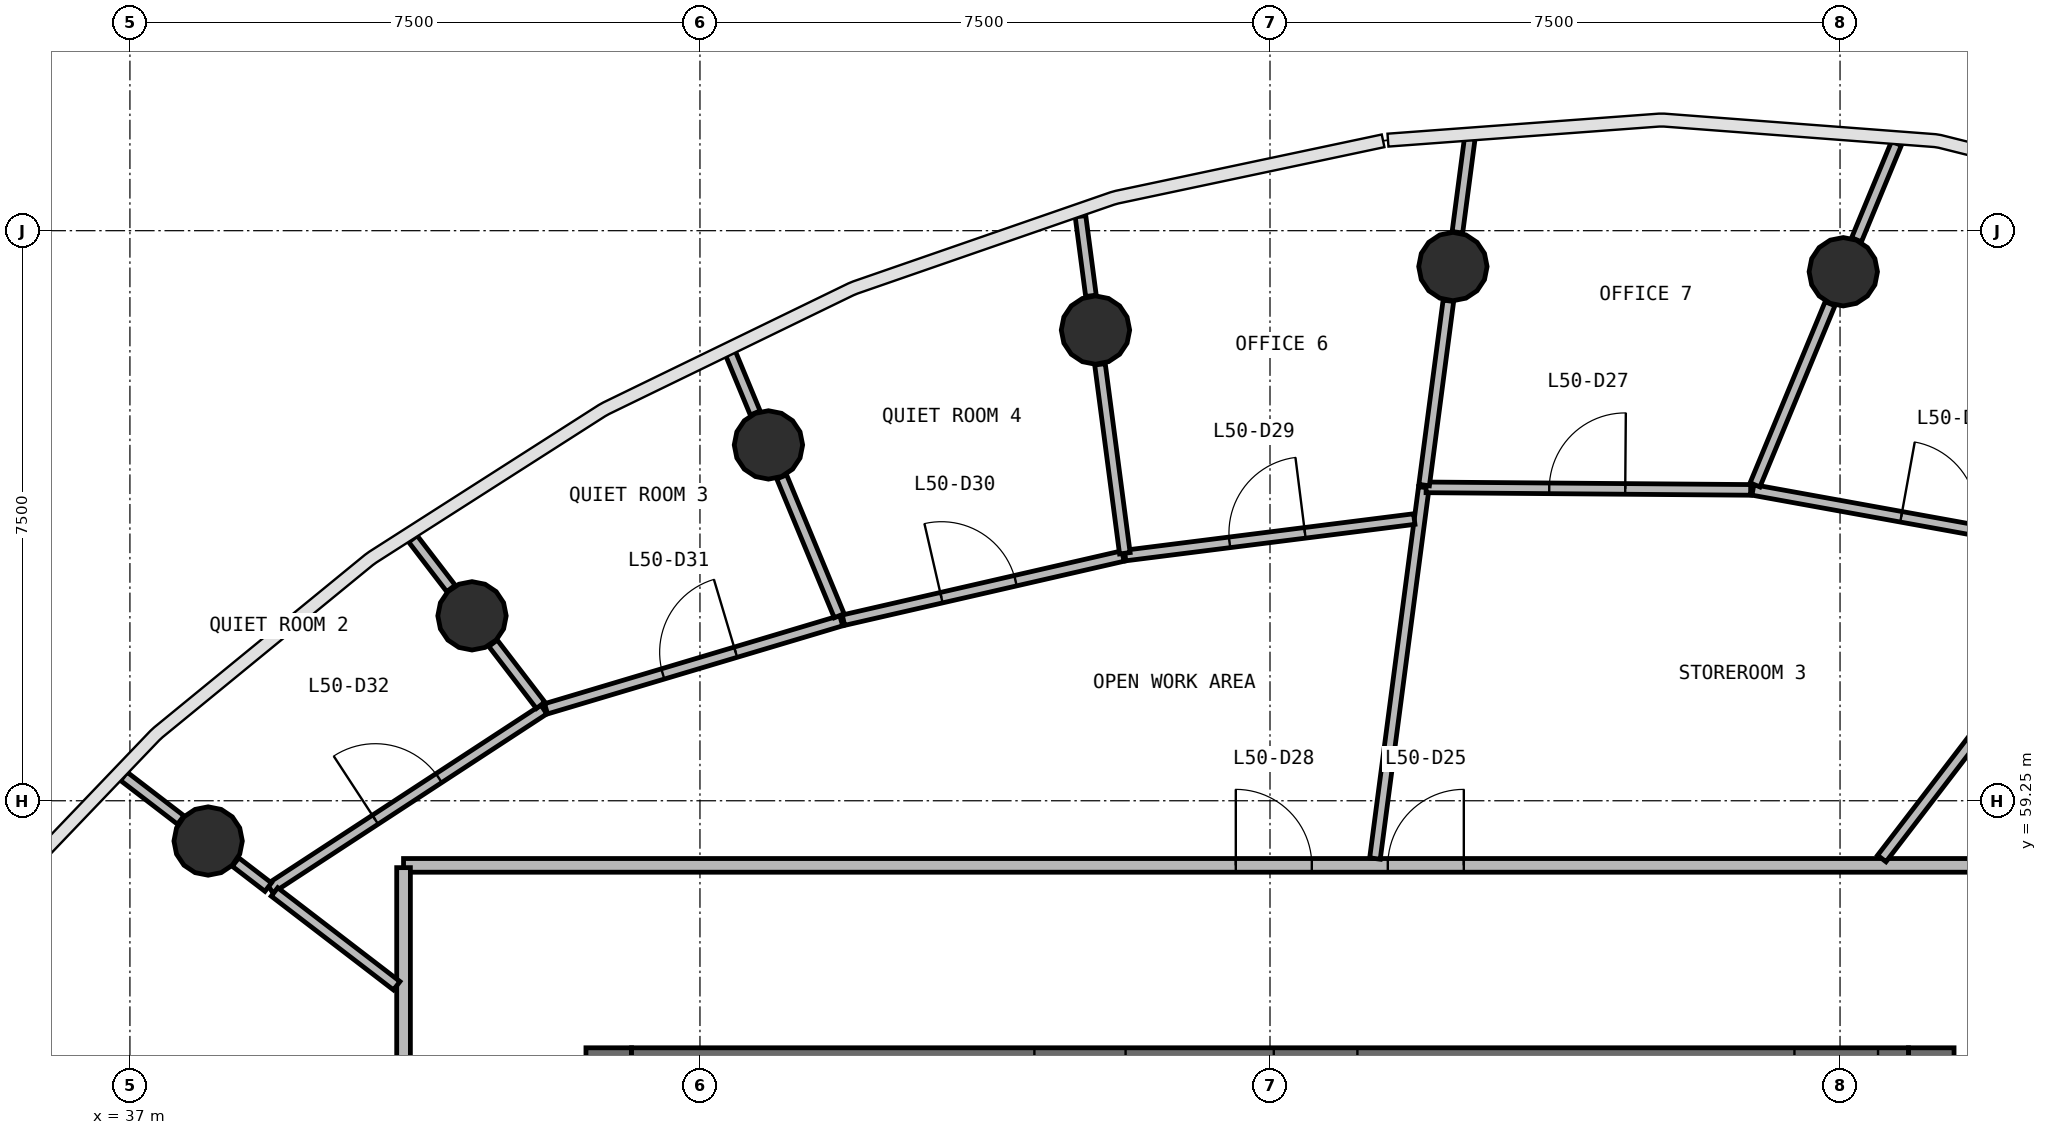
"""IFC4 building model, lengths in metres.
Left out: names, types, materials, properties, quantities, classifications, styles, units other than length and angle.
Written with IfcOpenShell. Run it as: python <this file> out.ifc"""

import sys

from ifc_helpers import new_model, si_unit, direction, frame, frame_2d, origin, origin_2d, place, context, subcontext, project, spatial, rectangle, circle, extrude, source, transform, mapped, element, fill, save


model = new_model("IFC4")
c1 = context("Model", 3, precision=1e-05, world=origin(), true_north=direction((0.0, 1.0)))
c2 = subcontext(c1, "Body", "Model", "MODEL_VIEW")
j1 = project(units=[si_unit("LENGTHUNIT", "METRE"), si_unit("PLANEANGLEUNIT", "RADIAN")], contexts=[c1])
p1 = place(None, origin())
s1 = spatial("IfcSite", under=j1, at=p1, CompositionType="ELEMENT")
p2 = place(p1, origin())
s2 = spatial("IfcBuilding", under=s1, at=p2, CompositionType="ELEMENT")
p3 = place(p2, frame((0.0, 0.0, 207.2)))
s3 = spatial("IfcBuildingStorey", under=s2, at=p3, CompositionType="ELEMENT", Elevation=207.2)
p4 = place(p3, frame((60.7, 40.0, 0.0), z_axis=(0.0, 0.0, 1.0), x_axis=(0.0, 1.0, 0.0)))
e1 = element("IfcWall", 1, at=p4, inside=s3, PredefinedType="SHEAR", context=c2, shape_type="SweptSolid", body=[
    extrude(rectangle(XDim=16.0, YDim=0.6, at=frame_2d((8.0, 0.0))), origin(), (0.0, 0.0, 1.0), 3.9),
])
p5 = place(p4, frame((7.1, 0.0, 0.0)))
e2 = element("IfcOpeningElement", 2, at=p5, cuts=e1, PredefinedType="OPENING", context=c2, shape_type="SweptSolid", body=[
    extrude(rectangle(XDim=1.8, YDim=2.1, at=frame_2d((0.9, 1.05))), frame((0.0, 0.31, 0.0), z_axis=(0.0, -1.0, 0.0), x_axis=(1.0, 0.0, 0.0)), (0.0, 0.0, 1.0), 0.62),
])
p6 = place(p3, frame((43.3, 56.0, 0.0), z_axis=(0.0, 0.0, 1.0), x_axis=(0.0, -1.0, 0.0)))
e3 = element("IfcWall", 3, at=p6, inside=s3, PredefinedType="SHEAR", context=c2, shape_type="SweptSolid", body=[
    extrude(rectangle(XDim=16.0, YDim=0.6, at=frame_2d((8.0, 0.0))), origin(), (0.0, 0.0, 1.0), 3.9),
])
p7 = place(p6, frame((7.1, 0.0, 0.0)))
e4 = element("IfcOpeningElement", 4, at=p7, cuts=e3, PredefinedType="OPENING", context=c2, shape_type="SweptSolid", body=[
    extrude(rectangle(XDim=1.8, YDim=2.1, at=frame_2d((0.9, 1.05))), frame((0.0, 0.31, 0.0), z_axis=(0.0, -1.0, 0.0), x_axis=(1.0, 0.0, 0.0)), (0.0, 0.0, 1.0), 0.62),
])
p8 = place(p3, frame((60.4, 55.7, 0.0), z_axis=(0.0, 0.0, 1.0), x_axis=(-1.0, 0.0, 0.0)))
e5 = element("IfcWall", 5, at=p8, inside=s3, PredefinedType="SHEAR", context=c2, shape_type="SweptSolid", body=[
    extrude(rectangle(XDim=16.8, YDim=0.6, at=frame_2d((8.4, 0.0))), origin(), (0.0, 0.0, 1.0), 3.9),
])
p9 = place(p8, frame((0.4, 0.0, 0.0)))
e6 = element("IfcOpeningElement", 6, at=p9, cuts=e5, PredefinedType="OPENING", context=c2, shape_type="SweptSolid", body=[
    extrude(rectangle(XDim=1.1, YDim=2.1, at=frame_2d((0.55, 1.05))), frame((0.0, 0.31, 0.0), z_axis=(0.0, -1.0, 0.0), x_axis=(1.0, 0.0, 0.0)), (0.0, 0.0, 1.0), 0.62),
])
p10 = place(p8, frame((10.3, 0.0, 0.0)))
e7 = element("IfcOpeningElement", 7, at=p10, cuts=e5, PredefinedType="OPENING", context=c2, shape_type="SweptSolid", body=[
    extrude(rectangle(XDim=1.2, YDim=2.1, at=frame_2d((0.6, 1.05))), frame((0.0, 0.31, 0.0), z_axis=(0.0, -1.0, 0.0), x_axis=(1.0, 0.0, 0.0)), (0.0, 0.0, 1.0), 0.62),
])
p11 = place(p8, frame((7.25, 0.0, 0.0)))
e8 = element("IfcOpeningElement", 8, at=p11, cuts=e5, PredefinedType="OPENING", context=c2, shape_type="SweptSolid", body=[
    extrude(rectangle(XDim=1.1, YDim=2.1, at=frame_2d((0.55, 1.05))), frame((0.0, 0.31, 0.0), z_axis=(0.0, -1.0, 0.0), x_axis=(1.0, 0.0, 0.0)), (0.0, 0.0, 1.0), 0.62),
])
m1 = source(origin(), c2, "Body", "SweptSolid", [
    extrude(circle(Radius=0.45, at=origin_2d()), origin(), (0.0, 0.0, 1.0), 3.9),
])
for number, where, z_axis, x_axis in (
    (9, (59.543, 66.21, 0.0), (0.0, 0.0, 1.0), (1.0, 0.0, 0.0)),
    (10, (54.406, 66.278, 0.0), (0.0, 0.0, 1.0), (1.0, 0.0, 0.0)),
    (11, (49.704, 65.442, 0.0), (0.0, 0.0, 1.0), (1.0, 0.0, 0.0)),
    (12, (45.401, 63.931, 0.0), (0.0, 0.0, 1.0), (1.0, 0.0, 0.0)),
    (13, (41.501, 61.683, 0.0), (0.0, 0.0, 1.0), (1.0, 0.0, 0.0)),
    (14, (38.029, 58.72, 0.0), (0.0, 0.0, 1.0), (1.0, 0.0, 0.0)),
):
    element("IfcColumn", number, at=place(p3, frame(where, z_axis=z_axis, x_axis=x_axis)), inside=s3, PredefinedType="COLUMN", context=c2, shape_type="MappedRepresentation", body=[
        mapped(m1, transform((0.0, 0.0, 0.0), scale=1.0)),
    ])
p12 = place(p3, frame((40.6, 58.4, 0.0), z_axis=(0.0, 0.0, 1.0), x_axis=(1.0, 0.0, 0.0)))
e15 = element("IfcWall", 15, at=p12, inside=s3, PredefinedType="PARTITIONING", context=c2, shape_type="SweptSolid", body=[
    extrude(rectangle(XDim=22.8, YDim=0.18, at=frame_2d((11.4, 0.0))), origin(), (0.0, 0.0, 1.0), 2.88),
])
p13 = place(p12, frame((12.95, 0.0, 0.0)))
e16 = element("IfcOpeningElement", 16, at=p13, cuts=e15, PredefinedType="OPENING", context=c2, shape_type="SweptSolid", body=[
    extrude(rectangle(XDim=1.0, YDim=2.1, at=frame_2d((0.5, 1.05))), frame((0.0, 0.1, 0.0), z_axis=(0.0, -1.0, 0.0), x_axis=(1.0, 0.0, 0.0)), (0.0, 0.0, 1.0), 0.2),
])
p14 = place(p12, frame((10.95, 0.0, 0.0)))
e17 = element("IfcOpeningElement", 17, at=p14, cuts=e15, PredefinedType="OPENING", context=c2, shape_type="SweptSolid", body=[
    extrude(rectangle(XDim=1.0, YDim=2.1, at=frame_2d((0.5, 1.05))), frame((0.0, 0.1, 0.0), z_axis=(0.0, -1.0, 0.0), x_axis=(1.0, 0.0, 0.0)), (0.0, 0.0, 1.0), 0.2),
])
p15 = place(p3, frame((40.6, 37.63, 0.0), z_axis=(0.0, 0.0, 1.0), x_axis=(0.0, 1.0, 0.0)))
e18 = element("IfcWall", 18, at=p15, inside=s3, PredefinedType="PARTITIONING", context=c2, shape_type="SweptSolid", body=[
    extrude(rectangle(XDim=20.74, YDim=0.18, at=frame_2d((10.37, 0.0))), origin(), (0.0, 0.0, 1.0), 2.88),
])
p16 = place(p15, frame((9.89, 0.0, 0.0)))
e19 = element("IfcOpeningElement", 19, at=p16, cuts=e18, PredefinedType="OPENING", context=c2, shape_type="SweptSolid", body=[
    extrude(rectangle(XDim=1.0, YDim=2.1, at=frame_2d((0.5, 1.05))), frame((0.0, 0.1, 0.0), z_axis=(0.0, -1.0, 0.0), x_axis=(1.0, 0.0, 0.0)), (0.0, 0.0, 1.0), 0.2),
])
p17 = place(p15, frame((4.29, 0.0, 0.0)))
e20 = element("IfcOpeningElement", 20, at=p17, cuts=e18, PredefinedType="OPENING", context=c2, shape_type="SweptSolid", body=[
    extrude(rectangle(XDim=1.0, YDim=2.1, at=frame_2d((0.5, 1.05))), frame((0.0, 0.1, 0.0), z_axis=(0.0, -1.0, 0.0), x_axis=(1.0, 0.0, 0.0)), (0.0, 0.0, 1.0), 0.2),
])
p18 = place(p3, frame((53.381, 58.49, 0.0), z_axis=(0.0, 0.0, 1.0), x_axis=(0.130510929427, 0.991446870639, 0.0)))
e21 = element("IfcWall", 21, at=p18, inside=s3, PredefinedType="PARTITIONING", context=c2, shape_type="SweptSolid", body=[
    extrude(rectangle(XDim=4.926, YDim=0.14, at=frame_2d((2.463, 0.0))), origin(), (0.0, 0.0, 1.0), 2.88),
])
p19 = place(p3, frame((58.354, 63.339, 0.0), z_axis=(0.0, 0.0, 1.0), x_axis=(0.983980456021, -0.178276364581, 0.0)))
e22 = element("IfcWall", 22, at=p19, inside=s3, PredefinedType="PARTITIONING", context=c2, shape_type="SweptSolid", body=[
    extrude(rectangle(XDim=4.833, YDim=0.14, at=frame_2d((2.417, 0.0))), origin(), (0.0, 0.0, 1.0), 2.88),
])
p20 = place(p19, frame((1.983, 0.0, 0.0)))
e23 = element("IfcOpeningElement", 23, at=p20, cuts=e22, PredefinedType="OPENING", context=c2, shape_type="SweptSolid", body=[
    extrude(rectangle(XDim=1.0, YDim=2.1, at=frame_2d((0.5, 1.05))), frame((0.0, 0.08, 0.0), z_axis=(0.0, -1.0, 0.0), x_axis=(1.0, 0.0, 0.0)), (0.0, 0.0, 1.0), 0.16),
])
p21 = place(p3, frame((54.054, 63.373, 0.0), z_axis=(0.0, 0.0, 1.0), x_axis=(0.999969319587, -0.007833255005, 0.0)))
e24 = element("IfcWall", 24, at=p21, inside=s3, PredefinedType="PARTITIONING", context=c2, shape_type="SweptSolid", body=[
    extrude(rectangle(XDim=4.27, YDim=0.14, at=frame_2d((2.135, 0.0))), origin(), (0.0, 0.0, 1.0), 2.88),
])
p22 = place(p21, frame((1.62, 0.0, 0.0)))
e25 = element("IfcOpeningElement", 25, at=p22, cuts=e24, PredefinedType="OPENING", context=c2, shape_type="SweptSolid", body=[
    extrude(rectangle(XDim=1.0, YDim=2.1, at=frame_2d((0.5, 1.05))), frame((0.0, 0.08, 0.0), z_axis=(0.0, -1.0, 0.0), x_axis=(1.0, 0.0, 0.0)), (0.0, 0.0, 1.0), 0.16),
])
p23 = place(p3, frame((38.843, 58.096, 0.0), z_axis=(0.0, 0.0, 1.0), x_axis=(0.83707650684, 0.547085844907, 0.0)))
e26 = element("IfcWall", 26, at=p23, inside=s3, PredefinedType="PARTITIONING", context=c2, shape_type="SweptSolid", body=[
    extrude(rectangle(XDim=4.305, YDim=0.14, at=frame_2d((2.152, 0.0))), origin(), (0.0, 0.0, 1.0), 2.88),
])
p24 = place(p23, frame((1.655, 0.0, 0.0)))
e27 = element("IfcOpeningElement", 27, at=p24, cuts=e26, PredefinedType="OPENING", context=c2, shape_type="SweptSolid", body=[
    extrude(rectangle(XDim=1.0, YDim=2.1, at=frame_2d((0.5, 1.05))), frame((0.0, 0.08, 0.0), z_axis=(0.0, -1.0, 0.0), x_axis=(1.0, 0.0, 0.0)), (0.0, 0.0, 1.0), 0.16),
])
p25 = place(p3, frame((42.475, 60.459, 0.0), z_axis=(0.0, 0.0, 1.0), x_axis=(0.958218274214, 0.286038002655, 0.0)))
e28 = element("IfcWall", 28, at=p25, inside=s3, PredefinedType="PARTITIONING", context=c2, shape_type="SweptSolid", body=[
    extrude(rectangle(XDim=4.053, YDim=0.14, at=frame_2d((2.027, 0.0))), origin(), (0.0, 0.0, 1.0), 2.88),
])
p26 = place(p25, frame((1.603, 0.0, 0.0)))
e29 = element("IfcOpeningElement", 29, at=p26, cuts=e28, PredefinedType="OPENING", context=c2, shape_type="SweptSolid", body=[
    extrude(rectangle(XDim=1.0, YDim=2.1, at=frame_2d((0.5, 1.05))), frame((0.0, 0.08, 0.0), z_axis=(0.0, -1.0, 0.0), x_axis=(1.0, 0.0, 0.0)), (0.0, 0.0, 1.0), 0.16),
])
p27 = place(p3, frame((50.094, 62.476, 0.0), z_axis=(0.0, 0.0, 1.0), x_axis=(0.99213420041, 0.12517878565, 0.0)))
e30 = element("IfcWall", 30, at=p27, inside=s3, PredefinedType="PARTITIONING", context=c2, shape_type="SweptSolid", body=[
    extrude(rectangle(XDim=3.834, YDim=0.14, at=frame_2d((1.917, 0.0))), origin(), (0.0, 0.0, 1.0), 2.88),
])
p28 = place(p27, frame((1.385, 0.0, 0.0)))
e31 = element("IfcOpeningElement", 31, at=p28, cuts=e30, PredefinedType="OPENING", context=c2, shape_type="SweptSolid", body=[
    extrude(rectangle(XDim=1.0, YDim=2.1, at=frame_2d((0.5, 1.05))), frame((0.0, 0.08, 0.0), z_axis=(0.0, -1.0, 0.0), x_axis=(1.0, 0.0, 0.0)), (0.0, 0.0, 1.0), 0.16),
])
p29 = place(p3, frame((46.388, 61.626, 0.0), z_axis=(0.0, 0.0, 1.0), x_axis=(0.974668578249, 0.223654113699, 0.0)))
e32 = element("IfcWall", 32, at=p29, inside=s3, PredefinedType="PARTITIONING", context=c2, shape_type="SweptSolid", body=[
    extrude(rectangle(XDim=3.772, YDim=0.14, at=frame_2d((1.886, 0.0))), origin(), (0.0, 0.0, 1.0), 2.88),
])
p30 = place(p29, frame((1.323, 0.0, 0.0)))
e33 = element("IfcOpeningElement", 33, at=p30, cuts=e32, PredefinedType="OPENING", context=c2, shape_type="SweptSolid", body=[
    extrude(rectangle(XDim=1.0, YDim=2.1, at=frame_2d((0.5, 1.05))), frame((0.0, 0.08, 0.0), z_axis=(0.0, -1.0, 0.0), x_axis=(1.0, 0.0, 0.0)), (0.0, 0.0, 1.0), 0.16),
])
p31 = place(p3, frame((60.049, 58.49, 0.0), z_axis=(0.0, 0.0, 1.0), x_axis=(0.60875050296, 0.793361724024, 0.0)))
e34 = element("IfcWall", 34, at=p31, inside=s3, PredefinedType="PARTITIONING", context=c2, shape_type="SweptSolid", body=[
    extrude(rectangle(XDim=3.663, YDim=0.14, at=frame_2d((1.832, 0.0))), origin(), (0.0, 0.0, 1.0), 2.88),
])
p32 = place(p3, frame((54.028, 63.403, 0.0), z_axis=(0.0, 0.0, 1.0), x_axis=(0.130581052229, 0.991437637373, 0.0)))
e35 = element("IfcWall", 35, at=p32, inside=s3, PredefinedType="PARTITIONING", context=c2, shape_type="SweptSolid", body=[
    extrude(rectangle(XDim=2.446, YDim=0.14, at=frame_2d((1.223, 0.0))), origin(), (0.0, 0.0, 1.0), 2.88),
])
p33 = place(p3, frame((38.39, 58.444, 0.0), z_axis=(0.0, 0.0, 1.0), x_axis=(0.793294129055, -0.608838586825, 0.0)))
e36 = element("IfcWall", 36, at=p33, inside=s3, PredefinedType="PARTITIONING", context=c2, shape_type="SweptSolid", body=[
    extrude(rectangle(XDim=0.541, YDim=0.14, at=frame_2d((0.271, 0.0))), origin(), (0.0, 0.0, 1.0), 2.88),
])
p34 = place(p3, frame((38.902, 58.051, 0.0), z_axis=(0.0, 0.0, 1.0), x_axis=(0.7933756116, -0.608732403374, 0.0)))
e37 = element("IfcWall", 37, at=p34, inside=s3, PredefinedType="PARTITIONING", context=c2, shape_type="SweptSolid", body=[
    extrude(rectangle(XDim=2.027, YDim=0.14, at=frame_2d((1.013, 0.0))), origin(), (0.0, 0.0, 1.0), 2.88),
])
p35 = place(p3, frame((58.381, 63.406, 0.0), z_axis=(0.0, 0.0, 1.0), x_axis=(0.382733405642, 0.923858831319, 0.0)))
e38 = element("IfcWall", 38, at=p35, inside=s3, PredefinedType="PARTITIONING", context=c2, shape_type="SweptSolid", body=[
    extrude(rectangle(XDim=2.58, YDim=0.14, at=frame_2d((1.29, 0.0))), origin(), (0.0, 0.0, 1.0), 2.88),
])
p36 = place(p3, frame((50.09, 62.506, 0.0), z_axis=(0.0, 0.0, 1.0), x_axis=(-0.130479700893, 0.991450980964, 0.0)))
e39 = element("IfcWall", 39, at=p36, inside=s3, PredefinedType="PARTITIONING", context=c2, shape_type="SweptSolid", body=[
    extrude(rectangle(XDim=2.507, YDim=0.14, at=frame_2d((1.254, 0.0))), origin(), (0.0, 0.0, 1.0), 2.88),
])
p37 = place(p3, frame((46.332, 61.684, 0.0), z_axis=(0.0, 0.0, 1.0), x_axis=(-0.382624406385, 0.923903979664, 0.0)))
e40 = element("IfcWall", 40, at=p37, inside=s3, PredefinedType="PARTITIONING", context=c2, shape_type="SweptSolid", body=[
    extrude(rectangle(XDim=1.977, YDim=0.14, at=frame_2d((0.989, 0.0))), origin(), (0.0, 0.0, 1.0), 2.88),
])
p38 = place(p3, frame((59.717, 66.63, 0.0), z_axis=(0.0, 0.0, 1.0), x_axis=(0.382733825207, 0.923858657502, 0.0)))
e41 = element("IfcWall", 41, at=p38, inside=s3, PredefinedType="PARTITIONING", context=c2, shape_type="SweptSolid", body=[
    extrude(rectangle(XDim=1.373, YDim=0.14, at=frame_2d((0.687, 0.0))), origin(), (0.0, 0.0, 1.0), 2.88),
])
p39 = place(p3, frame((54.466, 66.729, 0.0), z_axis=(0.0, 0.0, 1.0), x_axis=(0.130520415919, 0.991445621821, 0.0)))
e42 = element("IfcWall", 42, at=p39, inside=s3, PredefinedType="PARTITIONING", context=c2, shape_type="SweptSolid", body=[
    extrude(rectangle(XDim=1.246, YDim=0.14, at=frame_2d((0.623, 0.0))), origin(), (0.0, 0.0, 1.0), 2.88),
])
p40 = place(p3, frame((42.403, 60.507, 0.0), z_axis=(0.0, 0.0, 1.0), x_axis=(-0.608700642645, 0.793399979609, 0.0)))
e43 = element("IfcWall", 43, at=p40, inside=s3, PredefinedType="PARTITIONING", context=c2, shape_type="SweptSolid", body=[
    extrude(rectangle(XDim=1.028, YDim=0.14, at=frame_2d((0.514, 0.0))), origin(), (0.0, 0.0, 1.0), 2.88),
])
p41 = place(p3, frame((49.644, 65.893, 0.0), z_axis=(0.0, 0.0, 1.0), x_axis=(-0.130436565077, 0.99145665689, 0.0)))
e44 = element("IfcWall", 44, at=p41, inside=s3, PredefinedType="PARTITIONING", context=c2, shape_type="SweptSolid", body=[
    extrude(rectangle(XDim=1.056, YDim=0.14, at=frame_2d((0.528, 0.0))), origin(), (0.0, 0.0, 1.0), 2.88),
])
p42 = place(p3, frame((37.668, 58.997, 0.0), z_axis=(0.0, 0.0, 1.0), x_axis=(-0.793344167197, 0.608773383431, 0.0)))
e45 = element("IfcWall", 45, at=p42, inside=s3, PredefinedType="PARTITIONING", context=c2, shape_type="SweptSolid", body=[
    extrude(rectangle(XDim=0.944, YDim=0.14, at=frame_2d((0.472, 0.0))), origin(), (0.0, 0.0, 1.0), 2.88),
])
p43 = place(p3, frame((45.227, 64.352, 0.0), z_axis=(0.0, 0.0, 1.0), x_axis=(-0.382754217383, 0.92385020922, 0.0)))
e46 = element("IfcWall", 46, at=p43, inside=s3, PredefinedType="PARTITIONING", context=c2, shape_type="SweptSolid", body=[
    extrude(rectangle(XDim=0.857, YDim=0.14, at=frame_2d((0.429, 0.0))), origin(), (0.0, 0.0, 1.0), 2.88),
])
p44 = place(p3, frame((41.224, 62.044, 0.0), z_axis=(0.0, 0.0, 1.0), x_axis=(-0.608936045201, 0.793219322038, 0.0)))
e47 = element("IfcWall", 47, at=p44, inside=s3, PredefinedType="PARTITIONING", context=c2, shape_type="SweptSolid", body=[
    extrude(rectangle(XDim=0.823, YDim=0.14, at=frame_2d((0.411, 0.0))), origin(), (0.0, 0.0, 1.0), 2.88),
])
m2 = source(origin(), c2, "Body", "SweptSolid", [
    extrude(rectangle(XDim=1.0, YDim=2.1, at=frame_2d((0.5, 1.05))), frame((0.0, 0.025, 0.0), z_axis=(0.0, -1.0, 0.0), x_axis=(1.0, 0.0, 0.0)), (0.0, 0.0, 1.0), 0.05),
])
p45 = place(p13, origin())
e48 = element("IfcDoor", 48, at=p45, inside=s3, OperationType="SINGLE_SWING_RIGHT", PredefinedType="DOOR", context=c2, shape_type="MappedRepresentation", body=[
    mapped(m2, transform((0.0, 0.0, 0.0), scale=1.0)),
])
fill(e16, e48)
p46 = place(p20, origin())
e49 = element("IfcDoor", 49, at=p46, inside=s3, OperationType="SINGLE_SWING_LEFT", PredefinedType="DOOR", context=c2, shape_type="MappedRepresentation", body=[
    mapped(m2, transform((0.0, 0.0, 0.0), scale=1.0)),
])
fill(e23, e49)
p47 = place(p22, origin())
e50 = element("IfcDoor", 50, at=p47, inside=s3, OperationType="SINGLE_SWING_RIGHT", PredefinedType="DOOR", context=c2, shape_type="MappedRepresentation", body=[
    mapped(m2, transform((0.0, 0.0, 0.0), scale=1.0)),
])
fill(e25, e50)
p48 = place(p14, origin())
e51 = element("IfcDoor", 51, at=p48, inside=s3, OperationType="SINGLE_SWING_LEFT", PredefinedType="DOOR", context=c2, shape_type="MappedRepresentation", body=[
    mapped(m2, transform((0.0, 0.0, 0.0), scale=1.0)),
])
fill(e17, e51)
p49 = place(p28, origin())
e52 = element("IfcDoor", 52, at=p49, inside=s3, OperationType="SINGLE_SWING_RIGHT", PredefinedType="DOOR", context=c2, shape_type="MappedRepresentation", body=[
    mapped(m2, transform((0.0, 0.0, 0.0), scale=1.0)),
])
fill(e31, e52)
p50 = place(p30, origin())
e53 = element("IfcDoor", 53, at=p50, inside=s3, OperationType="SINGLE_SWING_LEFT", PredefinedType="DOOR", context=c2, shape_type="MappedRepresentation", body=[
    mapped(m2, transform((0.0, 0.0, 0.0), scale=1.0)),
])
fill(e33, e53)
p51 = place(p26, origin())
e54 = element("IfcDoor", 54, at=p51, inside=s3, OperationType="SINGLE_SWING_RIGHT", PredefinedType="DOOR", context=c2, shape_type="MappedRepresentation", body=[
    mapped(m2, transform((0.0, 0.0, 0.0), scale=1.0)),
])
fill(e29, e54)
p52 = place(p24, origin())
e55 = element("IfcDoor", 55, at=p52, inside=s3, OperationType="SINGLE_SWING_LEFT", PredefinedType="DOOR", context=c2, shape_type="MappedRepresentation", body=[
    mapped(m2, transform((0.0, 0.0, 0.0), scale=1.0)),
])
fill(e27, e55)
save(model, sys.argv[1])
